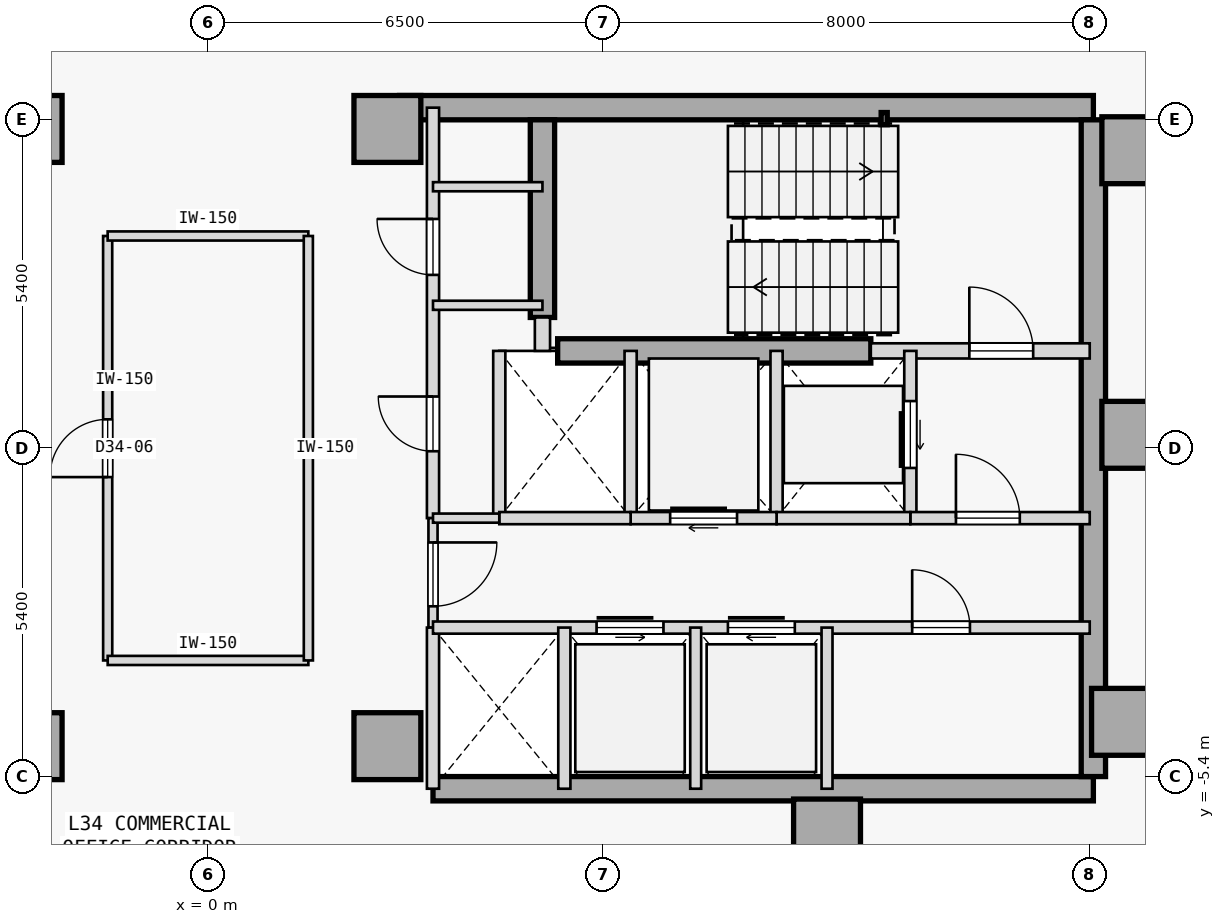
"""IFC4 building model, lengths in metres.
Left out: names, types, materials, properties, quantities, classifications, styles, units other than length and angle.
Written with IfcOpenShell. Run it as: python <this file> out.ifc"""

import sys

from ifc_helpers import new_model, si_unit, direction, frame, frame_2d, origin, origin_2d, place, context, subcontext, project, spatial, rectangle, hollow_rectangle, extrude, element, fill, save


model = new_model("IFC4")
c1 = context("Model", 3, precision=1e-05, world=origin(), true_north=direction((0.0, 1.0)))
c2 = subcontext(c1, "Body", "Model", "MODEL_VIEW")
j1 = project(units=[si_unit("LENGTHUNIT", "METRE"), si_unit("PLANEANGLEUNIT", "RADIAN")], contexts=[c1])
p1 = place(None, origin())
s1 = spatial("IfcSite", under=j1, at=p1, CompositionType="ELEMENT")
p2 = place(p1, origin())
s2 = spatial("IfcBuilding", under=s1, at=p2, CompositionType="ELEMENT")
p3 = place(p2, frame((0.0, 0.0, 135.5)))
s3 = spatial("IfcBuildingStorey", under=s2, at=p3, CompositionType="ELEMENT", Elevation=135.5)
for number, where, z_axis, x_axis in (
    (1, (-2.95, -4.9, 0.0), (0.0, 0.0, 1.0), (1.0, 0.0, 0.0)),
    (2, (-2.95, 5.25, 0.0), (0.0, 0.0, 1.0), (1.0, 0.0, 0.0)),
    (3, (15.25, 4.9, 0.0), (0.0, 0.0, 1.0), (1.0, 0.0, 0.0)),
    (4, (15.25, 0.22, 0.0), (0.0, 0.0, 1.0), (1.0, 0.0, 0.0)),
    (5, (15.08, -4.5, 0.0), (0.0, 0.0, 1.0), (1.0, 0.0, 0.0)),
    (6, (10.18, -6.32, 0.0), (0.0, 0.0, 1.0), (1.0, 0.0, 0.0)),
    (7, (2.95, -4.9, 0.0), (0.0, 0.0, 1.0), (1.0, 0.0, 0.0)),
    (8, (2.95, 5.25, 0.0), (0.0, 0.0, 1.0), (1.0, 0.0, 0.0)),
):
    element("IfcColumn", number, at=place(p3, frame(where, z_axis=z_axis, x_axis=x_axis)), inside=s3, PredefinedType="COLUMN", context=c2, shape_type="SweptSolid", body=[
        extrude(rectangle(XDim=1.1, YDim=1.1, at=origin_2d()), origin(), (0.0, 0.0, 1.0), 3.7),
    ])
p4 = place(p3, frame((3.15, 5.6, 0.0), z_axis=(0.0, 0.0, 1.0), x_axis=(1.0, 0.0, 0.0)))
e9 = element("IfcWall", 9, at=p4, inside=s3, PredefinedType="SHEAR", context=c2, shape_type="SweptSolid", body=[
    extrude(rectangle(XDim=11.41, YDim=0.4, at=frame_2d((5.705, 0.0))), origin(), (0.0, 0.0, 1.0), 3.475),
])
p5 = place(p3, frame((3.7, -5.6, 0.0), z_axis=(0.0, 0.0, 1.0), x_axis=(1.0, 0.0, 0.0)))
e10 = element("IfcWall", 10, at=p5, inside=s3, PredefinedType="SHEAR", context=c2, shape_type="SweptSolid", body=[
    extrude(rectangle(XDim=10.86, YDim=0.4, at=frame_2d((5.43, 0.0))), origin(), (0.0, 0.0, 1.0), 3.475),
])
p6 = place(p3, frame((14.56, -5.4, 0.0), z_axis=(0.0, 0.0, 1.0), x_axis=(0.0, 1.0, 0.0)))
e11 = element("IfcWall", 11, at=p6, inside=s3, PredefinedType="SHEAR", context=c2, shape_type="SweptSolid", body=[
    extrude(rectangle(XDim=10.8, YDim=0.4, at=frame_2d((5.4, 0.0))), origin(), (0.0, 0.0, 1.0), 3.475),
])
p7 = place(p3, frame((5.5, 2.15, 0.0), z_axis=(0.0, 0.0, 1.0), x_axis=(0.0, 1.0, 0.0)))
e12 = element("IfcWall", 12, at=p7, inside=s3, PredefinedType="SHEAR", context=c2, shape_type="SweptSolid", body=[
    extrude(rectangle(XDim=3.25, YDim=0.4, at=frame_2d((1.625, 0.0))), origin(), (0.0, 0.0, 1.0), 3.475),
])
p8 = place(p3, frame((5.75, 1.6, 0.0), z_axis=(0.0, 0.0, 1.0), x_axis=(1.0, 0.0, 0.0)))
e13 = element("IfcWall", 13, at=p8, inside=s3, PredefinedType="SHEAR", context=c2, shape_type="SweptSolid", body=[
    extrude(rectangle(XDim=5.15, YDim=0.4, at=frame_2d((2.575, 0.0))), origin(), (0.0, 0.0, 1.0), 3.475),
])
p9 = place(p3, frame((11.12, 5.42, 0.0), z_axis=(0.0, 0.0, 1.0), x_axis=(1.0, 0.0, 0.0)))
e14 = element("IfcColumn", 14, at=p9, inside=s3, PredefinedType="COLUMN", context=c2, shape_type="SweptSolid", body=[
    extrude(hollow_rectangle(XDim=0.1, YDim=0.2, WallThickness=0.008, at=origin_2d()), origin(), (0.0, 0.0, 1.0), 3.7),
])
p10 = place(p3, frame((10.9, 1.6, 0.0), z_axis=(0.0, 0.0, 1.0), x_axis=(1.0, 0.0, 0.0)))
e15 = element("IfcWall", 15, at=p10, inside=s3, PredefinedType="STANDARD", context=c2, shape_type="SweptSolid", body=[
    extrude(rectangle(XDim=3.6, YDim=0.25, at=frame_2d((1.8, 0.0))), origin(), (0.0, 0.0, 1.0), 3.475),
])
p11 = place(p10, frame((1.62, 0.0, 0.0)))
e16 = element("IfcOpeningElement", 16, at=p11, cuts=e15, PredefinedType="OPENING", context=c2, shape_type="SweptSolid", body=[
    extrude(rectangle(XDim=1.05, YDim=2.15, at=frame_2d((0.525, 1.075))), frame((0.0, 0.135, 0.0), z_axis=(0.0, -1.0, 0.0), x_axis=(1.0, 0.0, 0.0)), (0.0, 0.0, 1.0), 0.27),
])
p12 = place(p3, frame((5.5, 1.6, 0.0), z_axis=(0.0, 0.0, 1.0), x_axis=(0.0, 1.0, 0.0)))
e17 = element("IfcWall", 17, at=p12, inside=s3, PredefinedType="STANDARD", context=c2, shape_type="SweptSolid", body=[
    extrude(rectangle(XDim=0.55, YDim=0.25, at=frame_2d((0.275, 0.0))), origin(), (0.0, 0.0, 1.0), 3.475),
])
p13 = place(p3, frame((3.7, -1.15, 0.0), z_axis=(0.0, 0.0, 1.0), x_axis=(0.0, 1.0, 0.0)))
e18 = element("IfcWall", 18, at=p13, inside=s3, PredefinedType="STANDARD", context=c2, shape_type="SweptSolid", body=[
    extrude(rectangle(XDim=6.75, YDim=0.2, at=frame_2d((3.375, 0.0))), origin(), (0.0, 0.0, 1.0), 3.475),
])
p14 = place(p13, frame((1.1, 0.0, 0.0)))
e19 = element("IfcOpeningElement", 19, at=p14, cuts=e18, PredefinedType="OPENING", context=c2, shape_type="SweptSolid", body=[
    extrude(rectangle(XDim=0.9, YDim=2.15, at=frame_2d((0.45, 1.075))), frame((0.0, 0.11, 0.0), z_axis=(0.0, -1.0, 0.0), x_axis=(1.0, 0.0, 0.0)), (0.0, 0.0, 1.0), 0.22),
])
p15 = place(p13, frame((4.0, 0.0, 0.0)))
e20 = element("IfcOpeningElement", 20, at=p15, cuts=e18, PredefinedType="OPENING", context=c2, shape_type="SweptSolid", body=[
    extrude(rectangle(XDim=0.92, YDim=2.15, at=frame_2d((0.46, 1.075))), frame((0.0, 0.11, 0.0), z_axis=(0.0, -1.0, 0.0), x_axis=(1.0, 0.0, 0.0)), (0.0, 0.0, 1.0), 0.22),
])
p16 = place(p3, frame((3.7, -2.95, 0.0), z_axis=(0.0, 0.0, 1.0), x_axis=(0.0, 1.0, 0.0)))
e21 = element("IfcWall", 21, at=p16, inside=s3, PredefinedType="PARTITIONING", context=c2, shape_type="SweptSolid", body=[
    extrude(rectangle(XDim=1.8, YDim=0.15, at=frame_2d((0.9, 0.0))), origin(), (0.0, 0.0, 1.0), 3.475),
])
p17 = place(p16, frame((0.35, 0.0, 0.0)))
e22 = element("IfcOpeningElement", 22, at=p17, cuts=e21, PredefinedType="OPENING", context=c2, shape_type="SweptSolid", body=[
    extrude(rectangle(XDim=1.05, YDim=2.18, at=frame_2d((0.525, 1.09))), frame((0.0, 0.085, 0.0), z_axis=(0.0, -1.0, 0.0), x_axis=(1.0, 0.0, 0.0)), (0.0, 0.0, 1.0), 0.17),
])
p18 = place(p3, frame((3.7, -5.6, 0.0), z_axis=(0.0, 0.0, 1.0), x_axis=(0.0, 1.0, 0.0)))
e23 = element("IfcWall", 23, at=p18, inside=s3, PredefinedType="STANDARD", context=c2, shape_type="SweptSolid", body=[
    extrude(rectangle(XDim=2.65, YDim=0.2, at=frame_2d((1.325, 0.0))), origin(), (0.0, 0.0, 1.0), 3.475),
])
p19 = place(p3, frame((11.55, -1.15, 0.0), z_axis=(0.0, 0.0, 1.0), x_axis=(0.0, 1.0, 0.0)))
e24 = element("IfcWall", 24, at=p19, inside=s3, PredefinedType="STANDARD", context=c2, shape_type="SweptSolid", body=[
    extrude(rectangle(XDim=2.75, YDim=0.2, at=frame_2d((1.375, 0.0))), origin(), (0.0, 0.0, 1.0), 3.475),
])
p20 = place(p19, frame((0.825, 0.0, 0.0)))
e25 = element("IfcOpeningElement", 25, at=p20, cuts=e24, PredefinedType="OPENING", context=c2, shape_type="SweptSolid", body=[
    extrude(rectangle(XDim=1.1, YDim=2.15, at=frame_2d((0.55, 1.075))), frame((0.0, 0.11, 0.0), z_axis=(0.0, -1.0, 0.0), x_axis=(1.0, 0.0, 0.0)), (0.0, 0.0, 1.0), 0.22),
])
p21 = place(p3, frame((9.35, -1.15, 0.0), z_axis=(0.0, 0.0, 1.0), x_axis=(0.0, 1.0, 0.0)))
e26 = element("IfcWall", 26, at=p21, inside=s3, PredefinedType="STANDARD", context=c2, shape_type="SweptSolid", body=[
    extrude(rectangle(XDim=2.75, YDim=0.2, at=frame_2d((1.375, 0.0))), origin(), (0.0, 0.0, 1.0), 3.475),
])
p22 = place(p3, frame((11.55, -1.15, 0.0), z_axis=(0.0, 0.0, 1.0), x_axis=(1.0, 0.0, 0.0)))
e27 = element("IfcWall", 27, at=p22, inside=s3, PredefinedType="STANDARD", context=c2, shape_type="SweptSolid", body=[
    extrude(rectangle(XDim=2.95, YDim=0.2, at=frame_2d((1.475, 0.0))), origin(), (0.0, 0.0, 1.0), 3.475),
])
p23 = place(p22, frame((0.75, 0.0, 0.0)))
e28 = element("IfcOpeningElement", 28, at=p23, cuts=e27, PredefinedType="OPENING", context=c2, shape_type="SweptSolid", body=[
    extrude(rectangle(XDim=1.05, YDim=2.18, at=frame_2d((0.525, 1.09))), frame((0.0, 0.11, 0.0), z_axis=(0.0, -1.0, 0.0), x_axis=(1.0, 0.0, 0.0)), (0.0, 0.0, 1.0), 0.22),
])
p24 = place(p3, frame((9.35, -1.15, 0.0), z_axis=(0.0, 0.0, 1.0), x_axis=(1.0, 0.0, 0.0)))
e29 = element("IfcWall", 29, at=p24, inside=s3, PredefinedType="STANDARD", context=c2, shape_type="SweptSolid", body=[
    extrude(rectangle(XDim=2.2, YDim=0.2, at=frame_2d((1.1, 0.0))), origin(), (0.0, 0.0, 1.0), 3.475),
])
p25 = place(p3, frame((6.95, -1.15, 0.0), z_axis=(0.0, 0.0, 1.0), x_axis=(0.0, 1.0, 0.0)))
e30 = element("IfcWall", 30, at=p25, inside=s3, PredefinedType="STANDARD", context=c2, shape_type="SweptSolid", body=[
    extrude(rectangle(XDim=2.75, YDim=0.2, at=frame_2d((1.375, 0.0))), origin(), (0.0, 0.0, 1.0), 3.475),
])
p26 = place(p3, frame((6.95, -1.15, 0.0), z_axis=(0.0, 0.0, 1.0), x_axis=(1.0, 0.0, 0.0)))
e31 = element("IfcWall", 31, at=p26, inside=s3, PredefinedType="STANDARD", context=c2, shape_type="SweptSolid", body=[
    extrude(rectangle(XDim=2.4, YDim=0.2, at=frame_2d((1.2, 0.0))), origin(), (0.0, 0.0, 1.0), 3.475),
])
p27 = place(p26, frame((0.65, 0.0, 0.0)))
e32 = element("IfcOpeningElement", 32, at=p27, cuts=e31, PredefinedType="OPENING", context=c2, shape_type="SweptSolid", body=[
    extrude(rectangle(XDim=1.1, YDim=2.15, at=frame_2d((0.55, 1.075))), frame((0.0, 0.11, 0.0), z_axis=(0.0, -1.0, 0.0), x_axis=(1.0, 0.0, 0.0)), (0.0, 0.0, 1.0), 0.22),
])
p28 = place(p3, frame((4.79, -1.15, 0.0), z_axis=(0.0, 0.0, 1.0), x_axis=(0.0, 1.0, 0.0)))
e33 = element("IfcWall", 33, at=p28, inside=s3, PredefinedType="STANDARD", context=c2, shape_type="SweptSolid", body=[
    extrude(rectangle(XDim=2.75, YDim=0.2, at=frame_2d((1.375, 0.0))), origin(), (0.0, 0.0, 1.0), 3.475),
])
p29 = place(p3, frame((4.79, -1.15, 0.0), z_axis=(0.0, 0.0, 1.0), x_axis=(1.0, 0.0, 0.0)))
e34 = element("IfcWall", 34, at=p29, inside=s3, PredefinedType="STANDARD", context=c2, shape_type="SweptSolid", body=[
    extrude(rectangle(XDim=2.16, YDim=0.2, at=frame_2d((1.08, 0.0))), origin(), (0.0, 0.0, 1.0), 3.475),
])
p30 = place(p3, frame((3.7, -1.15, 0.0), z_axis=(0.0, 0.0, 1.0), x_axis=(1.0, 0.0, 0.0)))
e35 = element("IfcWall", 35, at=p30, inside=s3, PredefinedType="PARTITIONING", context=c2, shape_type="SweptSolid", body=[
    extrude(rectangle(XDim=1.09, YDim=0.15, at=frame_2d((0.545, 0.0))), origin(), (0.0, 0.0, 1.0), 3.475),
])
p31 = place(p3, frame((3.7, -2.95, 0.0), z_axis=(0.0, 0.0, 1.0), x_axis=(1.0, 0.0, 0.0)))
e36 = element("IfcWall", 36, at=p31, inside=s3, PredefinedType="STANDARD", context=c2, shape_type="SweptSolid", body=[
    extrude(rectangle(XDim=10.8, YDim=0.2, at=frame_2d((5.4, 0.0))), origin(), (0.0, 0.0, 1.0), 3.475),
])
p32 = place(p31, frame((2.69, 0.0, 0.0)))
e37 = element("IfcOpeningElement", 37, at=p32, cuts=e36, PredefinedType="OPENING", context=c2, shape_type="SweptSolid", body=[
    extrude(rectangle(XDim=1.1, YDim=2.15, at=frame_2d((0.55, 1.075))), frame((0.0, 0.11, 0.0), z_axis=(0.0, -1.0, 0.0), x_axis=(1.0, 0.0, 0.0)), (0.0, 0.0, 1.0), 0.22),
])
p33 = place(p31, frame((4.85, 0.0, 0.0)))
e38 = element("IfcOpeningElement", 38, at=p33, cuts=e36, PredefinedType="OPENING", context=c2, shape_type="SweptSolid", body=[
    extrude(rectangle(XDim=1.1, YDim=2.15, at=frame_2d((0.55, 1.075))), frame((0.0, 0.11, 0.0), z_axis=(0.0, -1.0, 0.0), x_axis=(1.0, 0.0, 0.0)), (0.0, 0.0, 1.0), 0.22),
])
p34 = place(p31, frame((7.88, 0.0, 0.0)))
e39 = element("IfcOpeningElement", 39, at=p34, cuts=e36, PredefinedType="OPENING", context=c2, shape_type="SweptSolid", body=[
    extrude(rectangle(XDim=0.95, YDim=2.15, at=frame_2d((0.475, 1.075))), frame((0.0, 0.11, 0.0), z_axis=(0.0, -1.0, 0.0), x_axis=(1.0, 0.0, 0.0)), (0.0, 0.0, 1.0), 0.22),
])
p35 = place(p3, frame((5.86, -5.6, 0.0), z_axis=(0.0, 0.0, 1.0), x_axis=(0.0, 1.0, 0.0)))
e40 = element("IfcWall", 40, at=p35, inside=s3, PredefinedType="STANDARD", context=c2, shape_type="SweptSolid", body=[
    extrude(rectangle(XDim=2.65, YDim=0.2, at=frame_2d((1.325, 0.0))), origin(), (0.0, 0.0, 1.0), 3.475),
])
for number, where, z_axis, x_axis in (
    (41, (10.18, -5.6, 0.0), (0.0, 0.0, 1.0), (0.0, 1.0, 0.0)),
    (42, (8.02, -5.6, 0.0), (0.0, 0.0, 1.0), (0.0, 1.0, 0.0)),
):
    element("IfcWall", number, at=place(p3, frame(where, z_axis=z_axis, x_axis=x_axis)), inside=s3, PredefinedType="STANDARD", context=c2, shape_type="SweptSolid", body=[
        extrude(rectangle(XDim=2.65, YDim=0.18, at=frame_2d((1.325, 0.0))), origin(), (0.0, 0.0, 1.0), 3.475),
    ])
for number, where, z_axis, x_axis in (
    (43, (3.7, 4.3, 0.0), (0.0, 0.0, 1.0), (1.0, 0.0, 0.0)),
    (44, (3.7, 2.35, 0.0), (0.0, 0.0, 1.0), (1.0, 0.0, 0.0)),
):
    element("IfcWall", number, at=place(p3, frame(where, z_axis=z_axis, x_axis=x_axis)), inside=s3, PredefinedType="PARTITIONING", context=c2, shape_type="SweptSolid", body=[
        extrude(rectangle(XDim=1.8, YDim=0.15, at=frame_2d((0.9, 0.0))), origin(), (0.0, 0.0, 1.0), 3.475),
    ])
p36 = place(p3, frame((-1.65, -3.49, 0.0), z_axis=(0.0, 0.0, 1.0), x_axis=(-0.000104928124, 0.999999994495, 0.0)))
e45 = element("IfcWall", 45, at=p36, inside=s3, PredefinedType="PARTITIONING", context=c2, shape_type="SweptSolid", body=[
    extrude(rectangle(XDim=6.98, YDim=0.15, at=frame_2d((3.49, 0.0))), origin(), (0.0, 0.0, 1.0), 3.475),
])
p37 = place(p36, frame((3.015, 0.0, 0.0)))
e46 = element("IfcOpeningElement", 46, at=p37, cuts=e45, PredefinedType="OPENING", context=c2, shape_type="SweptSolid", body=[
    extrude(rectangle(XDim=0.95, YDim=2.15, at=frame_2d((0.475, 1.075))), frame((0.0, 0.085, 0.0), z_axis=(0.0, -1.0, 0.0), x_axis=(1.0, 0.0, 0.0)), (0.0, 0.0, 1.0), 0.17),
])
p38 = place(p3, frame((-1.65, -3.49, 0.0), z_axis=(0.0, 0.0, 1.0), x_axis=(1.0, 0.0, 0.0)))
e47 = element("IfcWall", 47, at=p38, inside=s3, PredefinedType="PARTITIONING", context=c2, shape_type="SweptSolid", body=[
    extrude(rectangle(XDim=3.3, YDim=0.15, at=frame_2d((1.65, 0.0))), origin(), (0.0, 0.0, 1.0), 3.475),
])
p39 = place(p3, frame((-1.65, 3.49, 0.0), z_axis=(0.0, 0.0, 1.0), x_axis=(1.0, 0.0, 0.0)))
e48 = element("IfcWall", 48, at=p39, inside=s3, PredefinedType="PARTITIONING", context=c2, shape_type="SweptSolid", body=[
    extrude(rectangle(XDim=3.3, YDim=0.15, at=frame_2d((1.65, 0.0))), origin(), (0.0, 0.0, 1.0), 3.475),
])
p40 = place(p3, frame((1.65, -3.49, 0.0), z_axis=(0.0, 0.0, 1.0), x_axis=(-6.9952083e-05, 0.999999997553, 0.0)))
e49 = element("IfcWall", 49, at=p40, inside=s3, PredefinedType="PARTITIONING", context=c2, shape_type="SweptSolid", body=[
    extrude(rectangle(XDim=6.98, YDim=0.15, at=frame_2d((3.49, 0.0))), origin(), (0.0, 0.0, 1.0), 3.475),
])
p41 = place(p11, origin())
e50 = element("IfcDoor", 50, at=p41, inside=s3, OperationType="SINGLE_SWING_LEFT", PredefinedType="DOOR", context=c2, shape_type="SweptSolid", body=[
    extrude(rectangle(XDim=1.05, YDim=2.15, at=frame_2d((0.525, 1.075))), frame((0.0, 0.025, 0.0), z_axis=(0.0, -1.0, 0.0), x_axis=(1.0, 0.0, 0.0)), (0.0, 0.0, 1.0), 0.05),
])
fill(e16, e50)
p42 = place(p23, origin())
e51 = element("IfcDoor", 51, at=p42, inside=s3, OperationType="SINGLE_SWING_LEFT", PredefinedType="DOOR", context=c2, shape_type="SweptSolid", body=[
    extrude(rectangle(XDim=1.05, YDim=2.18, at=frame_2d((0.525, 1.09))), frame((0.0, 0.025, 0.0), z_axis=(0.0, -1.0, 0.0), x_axis=(1.0, 0.0, 0.0)), (0.0, 0.0, 1.0), 0.05),
])
fill(e28, e51)
p43 = place(p17, frame((1.05, 0.0, 0.0), z_axis=(0.0, 0.0, 1.0), x_axis=(-1.0, 0.0, 0.0)))
e52 = element("IfcDoor", 52, at=p43, inside=s3, OperationType="SINGLE_SWING_RIGHT", PredefinedType="DOOR", context=c2, shape_type="SweptSolid", body=[
    extrude(rectangle(XDim=1.05, YDim=2.18, at=frame_2d((0.525, 1.09))), frame((0.0, 0.025, 0.0), z_axis=(0.0, -1.0, 0.0), x_axis=(1.0, 0.0, 0.0)), (0.0, 0.0, 1.0), 0.05),
])
fill(e22, e52)
p44 = place(p20, origin())
e53 = element("IfcDoor", 53, at=p44, inside=s3, OperationType="SLIDING_TO_RIGHT", PredefinedType="DOOR", context=c2, shape_type="SweptSolid", body=[
    extrude(rectangle(XDim=1.1, YDim=2.15, at=frame_2d((0.55, 1.075))), frame((0.0, 0.025, 0.0), z_axis=(0.0, -1.0, 0.0), x_axis=(1.0, 0.0, 0.0)), (0.0, 0.0, 1.0), 0.05),
])
fill(e25, e53)
p45 = place(p27, origin())
e54 = element("IfcDoor", 54, at=p45, inside=s3, OperationType="SLIDING_TO_RIGHT", PredefinedType="DOOR", context=c2, shape_type="SweptSolid", body=[
    extrude(rectangle(XDim=1.1, YDim=2.15, at=frame_2d((0.55, 1.075))), frame((0.0, 0.025, 0.0), z_axis=(0.0, -1.0, 0.0), x_axis=(1.0, 0.0, 0.0)), (0.0, 0.0, 1.0), 0.05),
])
fill(e32, e54)
p46 = place(p32, origin())
e55 = element("IfcDoor", 55, at=p46, inside=s3, OperationType="SLIDING_TO_LEFT", PredefinedType="DOOR", context=c2, shape_type="SweptSolid", body=[
    extrude(rectangle(XDim=1.1, YDim=2.15, at=frame_2d((0.55, 1.075))), frame((0.0, 0.025, 0.0), z_axis=(0.0, -1.0, 0.0), x_axis=(1.0, 0.0, 0.0)), (0.0, 0.0, 1.0), 0.05),
])
fill(e37, e55)
p47 = place(p33, origin())
e56 = element("IfcDoor", 56, at=p47, inside=s3, OperationType="SLIDING_TO_RIGHT", PredefinedType="DOOR", context=c2, shape_type="SweptSolid", body=[
    extrude(rectangle(XDim=1.1, YDim=2.15, at=frame_2d((0.55, 1.075))), frame((0.0, 0.025, 0.0), z_axis=(0.0, -1.0, 0.0), x_axis=(1.0, 0.0, 0.0)), (0.0, 0.0, 1.0), 0.05),
])
fill(e38, e56)
p48 = place(p34, origin())
e57 = element("IfcDoor", 57, at=p48, inside=s3, OperationType="SINGLE_SWING_LEFT", PredefinedType="DOOR", context=c2, shape_type="SweptSolid", body=[
    extrude(rectangle(XDim=0.95, YDim=2.15, at=frame_2d((0.475, 1.075))), frame((0.0, 0.025, 0.0), z_axis=(0.0, -1.0, 0.0), x_axis=(1.0, 0.0, 0.0)), (0.0, 0.0, 1.0), 0.05),
])
fill(e39, e57)
p49 = place(p14, origin())
e58 = element("IfcDoor", 58, at=p49, inside=s3, OperationType="SINGLE_SWING_RIGHT", PredefinedType="DOOR", context=c2, shape_type="SweptSolid", body=[
    extrude(rectangle(XDim=0.9, YDim=2.15, at=frame_2d((0.45, 1.075))), frame((0.0, 0.025, 0.0), z_axis=(0.0, -1.0, 0.0), x_axis=(1.0, 0.0, 0.0)), (0.0, 0.0, 1.0), 0.05),
])
fill(e19, e58)
p50 = place(p15, origin())
e59 = element("IfcDoor", 59, at=p50, inside=s3, OperationType="SINGLE_SWING_RIGHT", PredefinedType="DOOR", context=c2, shape_type="SweptSolid", body=[
    extrude(rectangle(XDim=0.92, YDim=2.15, at=frame_2d((0.46, 1.075))), frame((0.0, 0.025, 0.0), z_axis=(0.0, -1.0, 0.0), x_axis=(1.0, 0.0, 0.0)), (0.0, 0.0, 1.0), 0.05),
])
fill(e20, e59)
p51 = place(p37, origin())
e60 = element("IfcDoor", 60, at=p51, inside=s3, OperationType="SINGLE_SWING_LEFT", PredefinedType="DOOR", context=c2, shape_type="SweptSolid", body=[
    extrude(rectangle(XDim=0.95, YDim=2.15, at=frame_2d((0.475, 1.075))), frame((0.0, 0.025, 0.0), z_axis=(0.0, -1.0, 0.0), x_axis=(1.0, 0.0, 0.0)), (0.0, 0.0, 1.0), 0.05),
])
fill(e46, e60)
save(model, sys.argv[1])
